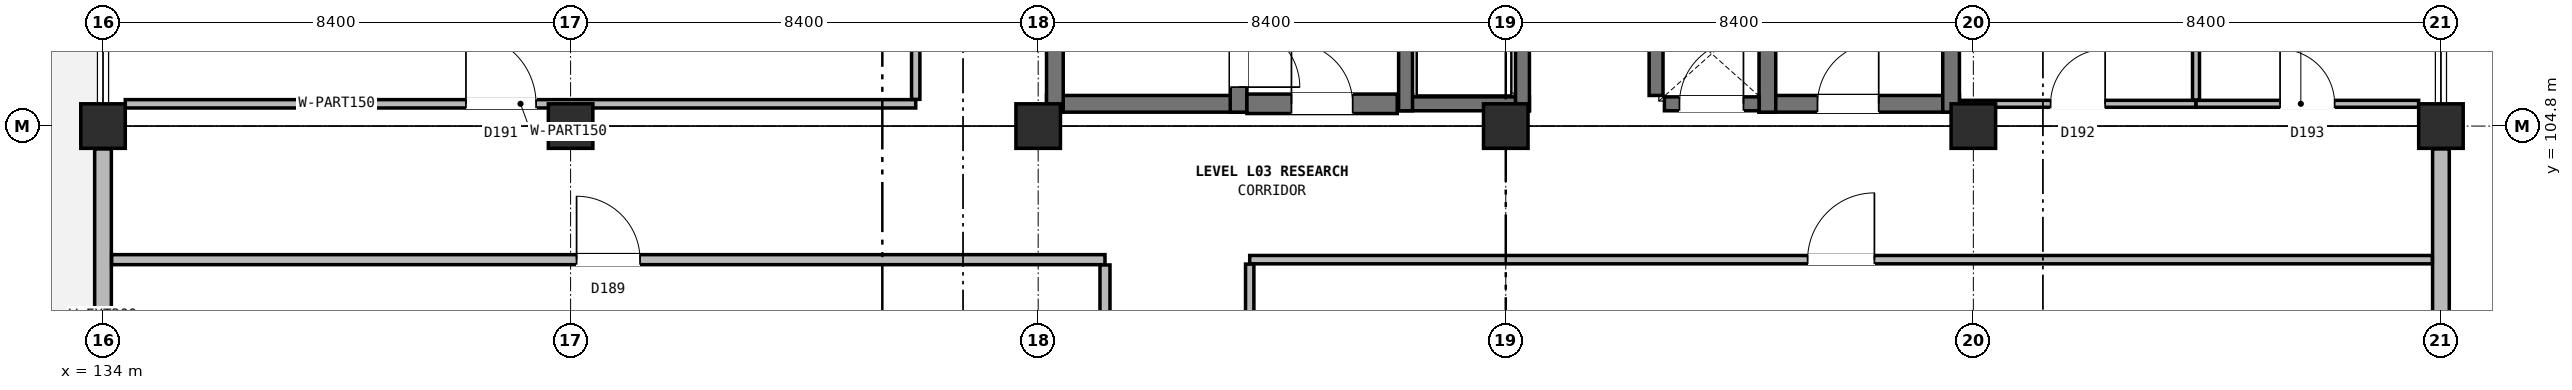
"""IFC4 building model, lengths in metres.
Left out: names, types, materials, properties, quantities, classifications, styles, units other than length and angle.
Written with IfcOpenShell. Run it as: python <this file> out.ifc"""

import sys

from ifc_helpers import new_model, si_unit, direction, frame, frame_2d, origin, origin_2d, place, context, subcontext, project, spatial, rectangle, extrude, element, fill, save


model = new_model("IFC4")
c1 = context("Model", 3, precision=1e-05, world=origin(), true_north=direction((0.0, 1.0)))
c2 = subcontext(c1, "Body", "Model", "MODEL_VIEW")
j1 = project(units=[si_unit("LENGTHUNIT", "METRE"), si_unit("PLANEANGLEUNIT", "RADIAN")], contexts=[c1])
p1 = place(None, origin())
s1 = spatial("IfcSite", under=j1, at=p1, CompositionType="ELEMENT")
p2 = place(p1, origin())
s2 = spatial("IfcBuilding", under=s1, at=p2, CompositionType="ELEMENT")
p3 = place(p2, frame((0.0, 0.0, 13.2)))
s3 = spatial("IfcBuildingStorey", under=s2, at=p3, CompositionType="ELEMENT", Elevation=13.2)
for number, where, z_axis, x_axis in (
    (1, (134.0, 104.8, 0.0), (0.0, 0.0, 1.0), (1.0, 0.0, 0.0)),
    (2, (142.4, 104.8, 0.0), (0.0, 0.0, 1.0), (1.0, 0.0, 0.0)),
    (3, (150.8, 104.8, 0.0), (0.0, 0.0, 1.0), (1.0, 0.0, 0.0)),
    (4, (159.2, 104.8, 0.0), (0.0, 0.0, 1.0), (1.0, 0.0, 0.0)),
    (5, (167.6, 104.8, 0.0), (0.0, 0.0, 1.0), (1.0, 0.0, 0.0)),
    (6, (176.0, 104.8, 0.0), (0.0, 0.0, 1.0), (1.0, 0.0, 0.0)),
):
    element("IfcColumn", number, at=place(p3, frame(where, z_axis=z_axis, x_axis=x_axis)), inside=s3, PredefinedType="COLUMN", context=c2, shape_type="SweptSolid", body=[
        extrude(rectangle(XDim=0.8, YDim=0.8, at=origin_2d()), origin(), (0.0, 0.0, 1.0), 4.0),
    ])
p4 = place(p3, frame((176.0, 96.41, 0.0), z_axis=(0.0, 0.0, 1.0), x_axis=(0.0, 1.0, 0.0)))
e7 = element("IfcWall", 7, at=p4, inside=s3, PredefinedType="SOLIDWALL", context=c2, shape_type="SweptSolid", body=[
    extrude(rectangle(XDim=7.98, YDim=0.3, at=frame_2d((3.99, 0.0))), origin(), (0.0, 0.0, 1.0), 3.25),
])
p5 = place(p4, frame((1.295, 0.0, 0.9)))
e8 = element("IfcOpeningElement", 8, at=p5, cuts=e7, PredefinedType="OPENING", context=c2, shape_type="SweptSolid", body=[
    extrude(rectangle(XDim=3.4, YDim=2.15, at=frame_2d((1.7, 1.075))), frame((0.0, 0.16, 0.0), z_axis=(0.0, -1.0, 0.0), x_axis=(1.0, 0.0, 0.0)), (0.0, 0.0, 1.0), 0.32),
])
p6 = place(p3, frame((134.0, 104.39, 0.0), z_axis=(0.0, 0.0, 1.0), x_axis=(0.0, -1.0, 0.0)))
e9 = element("IfcWall", 9, at=p6, inside=s3, PredefinedType="SOLIDWALL", context=c2, shape_type="SweptSolid", body=[
    extrude(rectangle(XDim=7.98, YDim=0.3, at=frame_2d((3.99, 0.0))), origin(), (0.0, 0.0, 1.0), 3.25),
])
p7 = place(p6, frame((3.39, 0.0, 0.0)))
e10 = element("IfcOpeningElement", 10, at=p7, cuts=e9, PredefinedType="OPENING", context=c2, shape_type="SweptSolid", body=[
    extrude(rectangle(XDim=1.2, YDim=2.25, at=frame_2d((0.6, 1.125))), frame((0.0, 0.16, 0.0), z_axis=(0.0, -1.0, 0.0), x_axis=(1.0, 0.0, 0.0)), (0.0, 0.0, 1.0), 0.32),
])
p8 = place(p3, frame((150.95, 105.2, 0.0), z_axis=(0.0, 0.0, 1.0), x_axis=(1.0, 0.0, 0.0)))
e11 = element("IfcWall", 11, at=p8, inside=s3, PredefinedType="SHEAR", context=c2, shape_type="SweptSolid", body=[
    extrude(rectangle(XDim=3.6, YDim=0.3, at=frame_2d((1.8, 0.0))), origin(), (0.0, 0.0, 1.0), 4.0),
])
p9 = place(p3, frame((151.1, 105.05, 0.0), z_axis=(0.0, 0.0, 1.0), x_axis=(0.0, 1.0, 0.0)))
e12 = element("IfcWall", 12, at=p9, inside=s3, PredefinedType="SHEAR", context=c2, shape_type="SweptSolid", body=[
    extrude(rectangle(XDim=8.3, YDim=0.3, at=frame_2d((4.15, 0.0))), origin(), (0.0, 0.0, 1.0), 4.0),
])
p10 = place(p3, frame((154.4, 105.05, 0.0), z_axis=(0.0, 0.0, 1.0), x_axis=(0.0, 1.0, 0.0)))
e13 = element("IfcWall", 13, at=p10, inside=s3, PredefinedType="SHEAR", context=c2, shape_type="SweptSolid", body=[
    extrude(rectangle(XDim=8.3, YDim=0.3, at=frame_2d((4.15, 0.0))), origin(), (0.0, 0.0, 1.0), 4.0),
])
p11 = place(p10, frame((0.45, 0.0, 0.0)))
e14 = element("IfcOpeningElement", 14, at=p11, cuts=e13, PredefinedType="OPENING", context=c2, shape_type="SweptSolid", body=[
    extrude(rectangle(XDim=1.1, YDim=2.2, at=frame_2d((0.55, 1.1))), frame((0.0, 0.16, 0.0), z_axis=(0.0, -1.0, 0.0), x_axis=(1.0, 0.0, 0.0)), (0.0, 0.0, 1.0), 0.32),
])
p12 = place(p3, frame((163.75, 105.2, 0.0), z_axis=(0.0, 0.0, 1.0), x_axis=(1.0, 0.0, 0.0)))
e15 = element("IfcWall", 15, at=p12, inside=s3, PredefinedType="SHEAR", context=c2, shape_type="SweptSolid", body=[
    extrude(rectangle(XDim=3.6, YDim=0.3, at=frame_2d((1.8, 0.0))), origin(), (0.0, 0.0, 1.0), 4.0),
])
p13 = place(p12, frame((1.05, 0.0, 0.0)))
e16 = element("IfcOpeningElement", 16, at=p13, cuts=e15, PredefinedType="OPENING", context=c2, shape_type="SweptSolid", body=[
    extrude(rectangle(XDim=1.1, YDim=2.2, at=frame_2d((0.55, 1.1))), frame((0.0, 0.16, 0.0), z_axis=(0.0, -1.0, 0.0), x_axis=(1.0, 0.0, 0.0)), (0.0, 0.0, 1.0), 0.32),
])
for number, where, z_axis, x_axis in (
    (17, (163.9, 105.05, 0.0), (0.0, 0.0, 1.0), (0.0, 1.0, 0.0)),
    (18, (167.2, 105.05, 0.0), (0.0, 0.0, 1.0), (0.0, 1.0, 0.0)),
):
    element("IfcWall", number, at=place(p3, frame(where, z_axis=z_axis, x_axis=x_axis)), inside=s3, PredefinedType="SHEAR", context=c2, shape_type="SweptSolid", body=[
        extrude(rectangle(XDim=8.3, YDim=0.3, at=frame_2d((4.15, 0.0))), origin(), (0.0, 0.0, 1.0), 4.0),
    ])
p14 = place(p3, frame((157.275, 105.2, 0.0), z_axis=(0.0, 0.0, 1.0), x_axis=(1.0, 0.0, 0.0)))
e19 = element("IfcWall", 19, at=p14, inside=s3, PredefinedType="SOLIDWALL", context=c2, shape_type="SweptSolid", body=[
    extrude(rectangle(XDim=2.35, YDim=0.25, at=frame_2d((1.175, 0.0))), origin(), (0.0, 0.0, 1.0), 3.68),
])
for number, where, z_axis, x_axis in (
    (20, (157.4, 105.075, 0.0), (0.0, 0.0, 1.0), (0.0, 1.0, 0.0)),
    (21, (159.5, 105.075, 0.0), (0.0, 0.0, 1.0), (0.0, 1.0, 0.0)),
):
    element("IfcWall", number, at=place(p3, frame(where, z_axis=z_axis, x_axis=x_axis)), inside=s3, PredefinedType="SOLIDWALL", context=c2, shape_type="SweptSolid", body=[
        extrude(rectangle(XDim=2.65, YDim=0.25, at=frame_2d((1.325, 0.0))), origin(), (0.0, 0.0, 1.0), 3.68),
    ])
p15 = place(p3, frame((154.55, 105.2, 0.0), z_axis=(0.0, 0.0, 1.0), x_axis=(1.0, 0.0, 0.0)))
e22 = element("IfcWall", 22, at=p15, inside=s3, PredefinedType="SHEAR", context=c2, shape_type="SweptSolid", body=[
    extrude(rectangle(XDim=2.7, YDim=0.35, at=frame_2d((1.35, 0.0))), origin(), (0.0, 0.0, 1.0), 3.68),
])
p16 = place(p15, frame((0.8, 0.0, 0.0)))
e23 = element("IfcOpeningElement", 23, at=p16, cuts=e22, PredefinedType="OPENING", context=c2, shape_type="SweptSolid", body=[
    extrude(rectangle(XDim=1.1, YDim=2.2, at=frame_2d((0.55, 1.1))), frame((0.0, 0.185, 0.0), z_axis=(0.0, -1.0, 0.0), x_axis=(1.0, 0.0, 0.0)), (0.0, 0.0, 1.0), 0.37),
])
p17 = place(p3, frame((161.9, 105.35, 0.0), z_axis=(0.0, 0.0, 1.0), x_axis=(0.0, 1.0, 0.0)))
e24 = element("IfcWall", 24, at=p17, inside=s3, PredefinedType="SOLIDWALL", context=c2, shape_type="SweptSolid", body=[
    extrude(rectangle(XDim=1.5, YDim=0.25, at=frame_2d((0.75, 0.0))), origin(), (0.0, 0.0, 1.0), 3.68),
])
p18 = place(p3, frame((162.05, 105.2, 0.0), z_axis=(0.0, 0.0, 1.0), x_axis=(1.0, 0.0, 0.0)))
e25 = element("IfcWall", 25, at=p18, inside=s3, PredefinedType="SOLIDWALL", context=c2, shape_type="SweptSolid", body=[
    extrude(rectangle(XDim=1.7, YDim=0.25, at=frame_2d((0.85, 0.0))), origin(), (0.0, 0.0, 1.0), 3.68),
])
p19 = place(p18, frame((0.27, 0.0, 0.0)))
e26 = element("IfcOpeningElement", 26, at=p19, cuts=e25, PredefinedType="OPENING", context=c2, shape_type="SweptSolid", body=[
    extrude(rectangle(XDim=1.15, YDim=2.2, at=frame_2d((0.575, 1.1))), frame((0.0, 0.135, 0.0), z_axis=(0.0, -1.0, 0.0), x_axis=(1.0, 0.0, 0.0)), (0.0, 0.0, 1.0), 0.27),
])
p20 = place(p3, frame((134.155, 102.4, 0.0), z_axis=(0.0, 0.0, 1.0), x_axis=(1.0, 0.0, 0.0)))
e27 = element("IfcWall", 27, at=p20, inside=s3, PredefinedType="PARTITIONING", context=c2, shape_type="SweptSolid", body=[
    extrude(rectangle(XDim=17.845, YDim=0.18, at=frame_2d((8.922, 0.0))), origin(), (0.0, 0.0, 1.0), 3.665),
])
p21 = place(p20, frame((8.353, 0.0, 0.0)))
e28 = element("IfcOpeningElement", 28, at=p21, cuts=e27, PredefinedType="OPENING", context=c2, shape_type="SweptSolid", body=[
    extrude(rectangle(XDim=1.14, YDim=2.24, at=frame_2d((0.57, 1.12))), frame((0.0, 0.1, 0.0), z_axis=(0.0, -1.0, 0.0), x_axis=(1.0, 0.0, 0.0)), (0.0, 0.0, 1.0), 0.2),
])
p22 = place(p3, frame((154.6, 102.4, 0.0), z_axis=(0.0, 0.0, 1.0), x_axis=(1.0, 0.0, 0.0)))
e29 = element("IfcWall", 29, at=p22, inside=s3, PredefinedType="PARTITIONING", context=c2, shape_type="SweptSolid", body=[
    extrude(rectangle(XDim=21.245, YDim=0.15, at=frame_2d((10.623, 0.0))), origin(), (0.0, 0.0, 1.0), 3.665),
])
p23 = place(p22, frame((10.022, 0.0, 0.0)))
e30 = element("IfcOpeningElement", 30, at=p23, cuts=e29, PredefinedType="OPENING", context=c2, shape_type="SweptSolid", body=[
    extrude(rectangle(XDim=1.2, YDim=2.26, at=frame_2d((0.6, 1.13))), frame((0.0, 0.085, 0.0), z_axis=(0.0, -1.0, 0.0), x_axis=(1.0, 0.0, 0.0)), (0.0, 0.0, 1.0), 0.17),
])
p24 = place(p3, frame((134.4, 105.2, 0.0), z_axis=(0.0, 0.0, 1.0), x_axis=(1.0, 0.0, 0.0)))
e31 = element("IfcWall", 31, at=p24, inside=s3, PredefinedType="PARTITIONING", context=c2, shape_type="SweptSolid", body=[
    extrude(rectangle(XDim=14.2, YDim=0.15, at=frame_2d((7.1, 0.0))), origin(), (0.0, 0.0, 1.0), 3.245),
])
p25 = place(p24, frame((6.12, 0.0, 0.0)))
e32 = element("IfcOpeningElement", 32, at=p25, cuts=e31, PredefinedType="OPENING", context=c2, shape_type="SweptSolid", body=[
    extrude(rectangle(XDim=1.26, YDim=2.28, at=frame_2d((0.63, 1.14))), frame((0.0, 0.085, 0.0), z_axis=(0.0, -1.0, 0.0), x_axis=(1.0, 0.0, 0.0)), (0.0, 0.0, 1.0), 0.17),
])
p26 = place(p3, frame((167.355, 105.2, 0.0), z_axis=(0.0, 0.0, 1.0), x_axis=(1.0, 0.0, 0.0)))
e33 = element("IfcWall", 33, at=p26, inside=s3, PredefinedType="PARTITIONING", context=c2, shape_type="SweptSolid", body=[
    extrude(rectangle(XDim=4.245, YDim=0.125, at=frame_2d((2.123, 0.0))), origin(), (0.0, 0.0, 1.0), 3.245),
])
p27 = place(p26, frame((1.633, 0.0, 0.0)))
e34 = element("IfcOpeningElement", 34, at=p27, cuts=e33, PredefinedType="OPENING", context=c2, shape_type="SweptSolid", body=[
    extrude(rectangle(XDim=0.98, YDim=2.1, at=frame_2d((0.49, 1.05))), frame((0.0, 0.073, 0.0), z_axis=(0.0, -1.0, 0.0), x_axis=(1.0, 0.0, 0.0)), (0.0, 0.0, 1.0), 0.145),
])
p28 = place(p3, frame((171.6, 105.2, 0.0), z_axis=(0.0, 0.0, 1.0), x_axis=(1.0, 0.0, 0.0)))
e35 = element("IfcWall", 35, at=p28, inside=s3, PredefinedType="PARTITIONING", context=c2, shape_type="SweptSolid", body=[
    extrude(rectangle(XDim=4.0, YDim=0.125, at=frame_2d((2.0, 0.0))), origin(), (0.0, 0.0, 1.0), 3.245),
])
p29 = place(p28, frame((1.51, 0.0, 0.0)))
e36 = element("IfcOpeningElement", 36, at=p29, cuts=e35, PredefinedType="OPENING", context=c2, shape_type="SweptSolid", body=[
    extrude(rectangle(XDim=0.98, YDim=2.1, at=frame_2d((0.49, 1.05))), frame((0.0, 0.073, 0.0), z_axis=(0.0, -1.0, 0.0), x_axis=(1.0, 0.0, 0.0)), (0.0, 0.0, 1.0), 0.145),
])
p30 = place(p3, frame((152.0, 91.5, 0.0), z_axis=(0.0, 0.0, 1.0), x_axis=(0.0, 1.0, 0.0)))
e37 = element("IfcWall", 37, at=p30, inside=s3, PredefinedType="PARTITIONING", context=c2, shape_type="SweptSolid", body=[
    extrude(rectangle(XDim=10.805, YDim=0.18, at=frame_2d((5.402, 0.0))), origin(), (0.0, 0.0, 1.0), 3.665),
])
p31 = place(p3, frame((154.6, 90.0, 0.0), z_axis=(0.0, 0.0, 1.0), x_axis=(0.0, 1.0, 0.0)))
e38 = element("IfcWall", 38, at=p31, inside=s3, PredefinedType="PARTITIONING", context=c2, shape_type="SweptSolid", body=[
    extrude(rectangle(XDim=12.32, YDim=0.15, at=frame_2d((6.16, 0.0))), origin(), (0.0, 0.0, 1.0), 3.665),
])
p32 = place(p3, frame((148.6, 105.28, 0.0), z_axis=(0.0, 0.0, 1.0), x_axis=(0.0, 1.0, 0.0)))
e39 = element("IfcWall", 39, at=p32, inside=s3, PredefinedType="PARTITIONING", context=c2, shape_type="SweptSolid", body=[
    extrude(rectangle(XDim=14.12, YDim=0.15, at=frame_2d((7.06, 0.0))), origin(), (0.0, 0.0, 1.0), 3.665),
])
p33 = place(p3, frame((171.6, 105.268, 0.0), z_axis=(0.0, 0.0, 1.0), x_axis=(0.0, 1.0, 0.0)))
e40 = element("IfcWall", 40, at=p33, inside=s3, PredefinedType="PARTITIONING", context=c2, shape_type="SweptSolid", body=[
    extrude(rectangle(XDim=16.978, YDim=0.125, at=frame_2d((8.489, 0.0))), origin(), (0.0, 0.0, 1.0), 3.665),
])
p34 = place(p11, frame((1.1, 0.0, 0.0), z_axis=(0.0, 0.0, 1.0), x_axis=(-1.0, 0.0, 0.0)))
e41 = element("IfcDoor", 41, at=p34, inside=s3, OperationType="SINGLE_SWING_LEFT", PredefinedType="DOOR", context=c2, shape_type="SweptSolid", body=[
    extrude(rectangle(XDim=1.1, YDim=2.2, at=frame_2d((0.55, 1.1))), frame((0.0, 0.025, 0.0), z_axis=(0.0, -1.0, 0.0), x_axis=(1.0, 0.0, 0.0)), (0.0, 0.0, 1.0), 0.05),
])
fill(e14, e41)
p35 = place(p13, origin())
e42 = element("IfcDoor", 42, at=p35, inside=s3, OperationType="SINGLE_SWING_RIGHT", PredefinedType="DOOR", context=c2, shape_type="SweptSolid", body=[
    extrude(rectangle(XDim=1.1, YDim=2.2, at=frame_2d((0.55, 1.1))), frame((0.0, 0.025, 0.0), z_axis=(0.0, -1.0, 0.0), x_axis=(1.0, 0.0, 0.0)), (0.0, 0.0, 1.0), 0.05),
])
fill(e16, e42)
p36 = place(p16, origin())
e43 = element("IfcDoor", 43, at=p36, inside=s3, OperationType="SINGLE_SWING_LEFT", PredefinedType="DOOR", context=c2, shape_type="SweptSolid", body=[
    extrude(rectangle(XDim=1.1, YDim=2.2, at=frame_2d((0.55, 1.1))), frame((0.0, 0.025, 0.0), z_axis=(0.0, -1.0, 0.0), x_axis=(1.0, 0.0, 0.0)), (0.0, 0.0, 1.0), 0.05),
])
fill(e23, e43)
p37 = place(p19, origin())
e44 = element("IfcDoor", 44, at=p37, inside=s3, OperationType="SINGLE_SWING_RIGHT", PredefinedType="DOOR", context=c2, shape_type="SweptSolid", body=[
    extrude(rectangle(XDim=1.15, YDim=2.2, at=frame_2d((0.575, 1.1))), frame((0.0, 0.025, 0.0), z_axis=(0.0, -1.0, 0.0), x_axis=(1.0, 0.0, 0.0)), (0.0, 0.0, 1.0), 0.05),
])
fill(e26, e44)
p38 = place(p21, origin())
e45 = element("IfcDoor", 45, at=p38, inside=s3, OperationType="SINGLE_SWING_LEFT", PredefinedType="DOOR", context=c2, shape_type="SweptSolid", body=[
    extrude(rectangle(XDim=1.14, YDim=2.24, at=frame_2d((0.57, 1.12))), frame((0.0, 0.025, 0.0), z_axis=(0.0, -1.0, 0.0), x_axis=(1.0, 0.0, 0.0)), (0.0, 0.0, 1.0), 0.05),
])
fill(e28, e45)
p39 = place(p23, origin())
e46 = element("IfcDoor", 46, at=p39, inside=s3, OperationType="SINGLE_SWING_RIGHT", PredefinedType="DOOR", context=c2, shape_type="SweptSolid", body=[
    extrude(rectangle(XDim=1.2, YDim=2.26, at=frame_2d((0.6, 1.13))), frame((0.0, 0.025, 0.0), z_axis=(0.0, -1.0, 0.0), x_axis=(1.0, 0.0, 0.0)), (0.0, 0.0, 1.0), 0.05),
])
fill(e30, e46)
p40 = place(p25, origin())
e47 = element("IfcDoor", 47, at=p40, inside=s3, OperationType="SINGLE_SWING_LEFT", PredefinedType="DOOR", context=c2, shape_type="SweptSolid", body=[
    extrude(rectangle(XDim=1.26, YDim=2.28, at=frame_2d((0.63, 1.14))), frame((0.0, 0.025, 0.0), z_axis=(0.0, -1.0, 0.0), x_axis=(1.0, 0.0, 0.0)), (0.0, 0.0, 1.0), 0.05),
])
fill(e32, e47)
p41 = place(p27, origin())
e48 = element("IfcDoor", 48, at=p41, inside=s3, OperationType="SINGLE_SWING_RIGHT", PredefinedType="DOOR", context=c2, shape_type="SweptSolid", body=[
    extrude(rectangle(XDim=0.98, YDim=2.1, at=frame_2d((0.49, 1.05))), frame((0.0, 0.025, 0.0), z_axis=(0.0, -1.0, 0.0), x_axis=(1.0, 0.0, 0.0)), (0.0, 0.0, 1.0), 0.05),
])
fill(e34, e48)
p42 = place(p29, origin())
e49 = element("IfcDoor", 49, at=p42, inside=s3, OperationType="SINGLE_SWING_LEFT", PredefinedType="DOOR", context=c2, shape_type="SweptSolid", body=[
    extrude(rectangle(XDim=0.98, YDim=2.1, at=frame_2d((0.49, 1.05))), frame((0.0, 0.025, 0.0), z_axis=(0.0, -1.0, 0.0), x_axis=(1.0, 0.0, 0.0)), (0.0, 0.0, 1.0), 0.05),
])
fill(e36, e49)
save(model, sys.argv[1])
